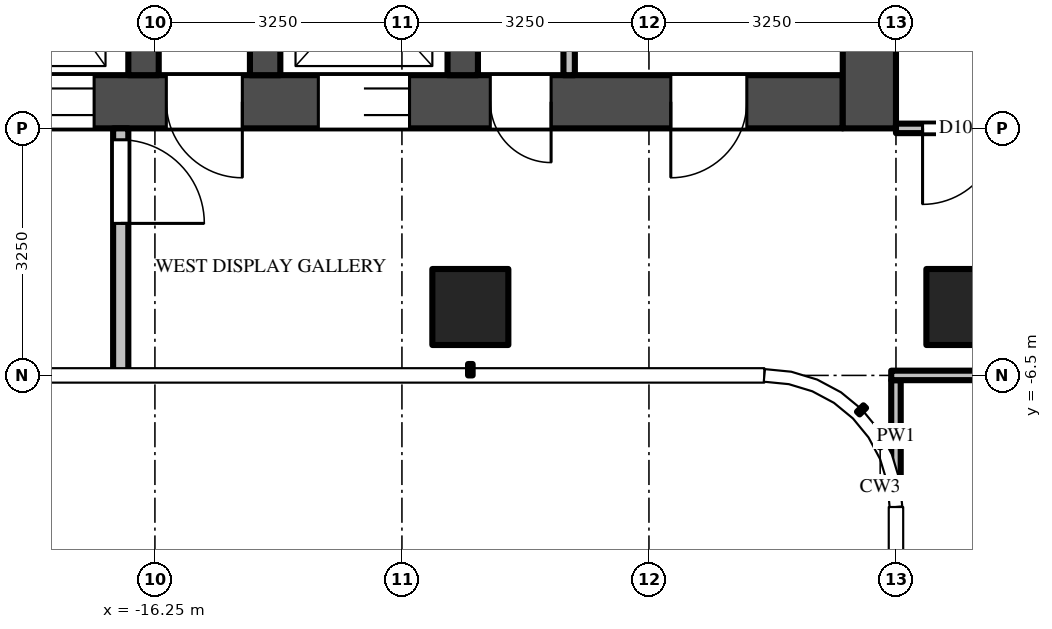
"""IFC4 building model, lengths in metres.
Left out: names, types, materials, properties, quantities, classifications, styles, units other than length and angle.
Written with IfcOpenShell. Run it as: python <this file> out.ifc"""

import sys

from ifc_helpers import new_model, si_unit, direction, frame, frame_2d, origin, origin_2d, place, context, subcontext, project, spatial, polyline, rectangle, outline, extrude, source, transform, mapped, element, fill, save


model = new_model("IFC4")
c1 = context("Model", 3, precision=1e-05, world=origin(), true_north=direction((0.0, 1.0)))
c2 = subcontext(c1, "Body", "Model", "MODEL_VIEW")
j1 = project(units=[si_unit("LENGTHUNIT", "METRE"), si_unit("PLANEANGLEUNIT", "RADIAN")], contexts=[c1])
p1 = place(None, origin())
s1 = spatial("IfcSite", under=j1, at=p1, CompositionType="ELEMENT")
p2 = place(p1, origin())
s2 = spatial("IfcBuilding", under=s1, at=p2, CompositionType="ELEMENT")
p3 = place(p2, frame((0.0, 0.0, 314.5)))
s3 = spatial("IfcBuildingStorey", under=s2, at=p3, CompositionType="ELEMENT", Elevation=314.5)
m1 = source(origin(), c2, "Body", "SweptSolid", [
    extrude(rectangle(XDim=1.0, YDim=1.0, at=origin_2d()), origin(), (0.0, 0.0, 1.0), 3.9),
])
for number, where, z_axis, x_axis in (
    (1, (-5.6, -5.6, 0.0), (0.0, 0.0, 1.0), (1.0, 0.0, 0.0)),
    (2, (-12.1, -5.6, 0.0), (0.0, 0.0, 1.0), (1.0, 0.0, 0.0)),
):
    element("IfcColumn", number, at=place(p3, frame(where, z_axis=z_axis, x_axis=x_axis)), inside=s3, PredefinedType="COLUMN", context=c2, shape_type="MappedRepresentation", body=[
        mapped(m1, transform((0.0, 0.0, 0.0))),
    ])
m2 = source(origin(), c2, "Body", "SweptSolid", [
    extrude(rectangle(XDim=14.85, YDim=0.7, at=frame_2d((7.425, 0.0))), origin(), (0.0, 0.0, 1.0), 3.7),
])
p4 = place(p3, frame((-7.2, -2.9, 0.0), z_axis=(0.0, 0.0, 1.0), x_axis=(-1.0, 0.0, 0.0)))
e3 = element("IfcWall", 3, at=p4, inside=s3, PredefinedType="SHEAR", context=c2, shape_type="MappedRepresentation", body=[
    mapped(m2, transform((0.0, 0.0, 0.0))),
])
m3 = source(origin(), c2, "Body", "SweptSolid", [
    extrude(rectangle(XDim=1.2, YDim=2.1, at=frame_2d((0.6, 1.05))), frame((0.0, 0.36, 0.0), z_axis=(0.0, -1.0, 0.0), x_axis=(1.0, 0.0, 0.0)), (0.0, 0.0, 1.0), 0.72),
])
p5 = place(p4, frame((5.7, 0.0, 0.0)))
e4 = element("IfcOpeningElement", 4, at=p5, cuts=e3, PredefinedType="OPENING", context=c2, shape_type="MappedRepresentation", body=[
    mapped(m3, transform((0.0, 0.0, 0.0))),
])
m4 = source(origin(), c2, "Body", "SweptSolid", [
    extrude(rectangle(XDim=1.3, YDim=2.1, at=frame_2d((0.65, 1.05))), frame((0.0, 0.36, 0.0), z_axis=(0.0, -1.0, 0.0), x_axis=(1.0, 0.0, 0.0)), (0.0, 0.0, 1.0), 0.72),
])
p6 = place(p4, frame((12.2, 0.0, 0.0)))
e5 = element("IfcOpeningElement", 5, at=p6, cuts=e3, PredefinedType="OPENING", context=c2, shape_type="MappedRepresentation", body=[
    mapped(m4, transform((0.0, 0.0, 0.0))),
])
p7 = place(p4, frame((9.85, 0.0, 0.0)))
e6 = element("IfcOpeningElement", 6, at=p7, cuts=e3, PredefinedType="OPENING", context=c2, shape_type="MappedRepresentation", body=[
    mapped(m3, transform((0.0, 0.0, 0.0))),
])
m5 = source(origin(), c2, "Body", "SweptSolid", [
    extrude(rectangle(XDim=1.0, YDim=2.1, at=frame_2d((0.5, 1.05))), frame((0.0, 0.36, 0.0), z_axis=(0.0, -1.0, 0.0), x_axis=(1.0, 0.0, 0.0)), (0.0, 0.0, 1.0), 0.72),
])
p8 = place(p4, frame((7.9, 0.0, 0.0)))
e7 = element("IfcOpeningElement", 7, at=p8, cuts=e3, PredefinedType="OPENING", context=c2, shape_type="MappedRepresentation", body=[
    mapped(m5, transform((0.0, 0.0, 0.0))),
])
p9 = place(p4, frame((1.262, 0.0, 0.0)))
e8 = element("IfcOpeningElement", 8, at=p9, cuts=e3, PredefinedType="OPENING", context=c2, shape_type="MappedRepresentation", body=[
    mapped(m5, transform((0.0, 0.0, 0.0))),
])
m6 = source(origin(), c2, "Body", "SweptSolid", [
    extrude(rectangle(XDim=0.8, YDim=2.1, at=frame_2d((0.4, 1.05))), frame((0.0, 0.36, 0.0), z_axis=(0.0, -1.0, 0.0), x_axis=(1.0, 0.0, 0.0)), (0.0, 0.0, 1.0), 0.72),
])
p10 = place(p4, frame((3.837, 0.0, 0.0)))
e9 = element("IfcOpeningElement", 9, at=p10, cuts=e3, PredefinedType="OPENING", context=c2, shape_type="MappedRepresentation", body=[
    mapped(m6, transform((0.0, 0.0, 0.0))),
])
m7 = source(origin(), c2, "Body", "SweptSolid", [
    extrude(rectangle(XDim=9.05, YDim=0.7, at=frame_2d((4.525, 0.0))), origin(), (0.0, 0.0, 1.0), 3.7),
])
p11 = place(p3, frame((-6.85, 5.8, 0.0), z_axis=(0.0, 0.0, 1.0), x_axis=(0.0, -1.0, 0.0)))
e10 = element("IfcWall", 10, at=p11, inside=s3, PredefinedType="SHEAR", context=c2, shape_type="MappedRepresentation", body=[
    mapped(m7, transform((0.0, 0.0, 0.0))),
])
m8 = source(origin(), c2, "Body", "SweptSolid", [
    extrude(rectangle(XDim=1.8, YDim=2.1, at=frame_2d((0.9, 1.05))), frame((0.0, 0.36, 0.0), z_axis=(0.0, -1.0, 0.0), x_axis=(1.0, 0.0, 0.0)), (0.0, 0.0, 1.0), 0.72),
])
p12 = place(p11, frame((3.15, 0.0, 0.0)))
e11 = element("IfcOpeningElement", 11, at=p12, cuts=e10, PredefinedType="OPENING", context=c2, shape_type="MappedRepresentation", body=[
    mapped(m8, transform((0.0, 0.0, 0.0))),
])
m9 = source(origin(), c2, "Body", "SweptSolid", [
    extrude(rectangle(XDim=2.45, YDim=0.4, at=frame_2d((1.225, 0.0))), origin(), (0.0, 0.0, 1.0), 3.7),
])
for number, where, z_axis, x_axis in (
    (12, (-12.2, -0.1, 0.0), (0.0, 0.0, 1.0), (0.0, -1.0, 0.0)),
    (13, (-14.8, -0.1, 0.0), (0.0, 0.0, 1.0), (0.0, -1.0, 0.0)),
    (14, (-16.4, -0.1, 0.0), (0.0, 0.0, 1.0), (0.0, -1.0, 0.0)),
):
    element("IfcWall", number, at=place(p3, frame(where, z_axis=z_axis, x_axis=x_axis)), inside=s3, PredefinedType="SHEAR", context=c2, shape_type="MappedRepresentation", body=[
        mapped(m9, transform((0.0, 0.0, 0.0))),
    ])
m10 = source(origin(), c2, "Body", "SweptSolid", [
    extrude(rectangle(XDim=3.25, YDim=0.2, at=frame_2d((1.625, 0.0))), origin(), (0.0, 0.0, 1.0), 3.7),
])
p13 = place(p3, frame((-16.7, -3.25, 0.0), z_axis=(0.0, 0.0, 1.0), x_axis=(0.0, -1.0, 0.0)))
e15 = element("IfcWall", 15, at=p13, inside=s3, PredefinedType="PARTITIONING", context=c2, shape_type="MappedRepresentation", body=[
    mapped(m10, transform((0.0, 0.0, 0.0))),
])
m11 = source(origin(), c2, "Body", "SweptSolid", [
    extrude(rectangle(XDim=1.1, YDim=2.1, at=frame_2d((0.55, 1.05))), frame((0.0, 0.11, 0.0), z_axis=(0.0, -1.0, 0.0), x_axis=(1.0, 0.0, 0.0)), (0.0, 0.0, 1.0), 0.22),
])
p14 = place(p13, frame((0.15, 0.0, 0.0)))
e16 = element("IfcOpeningElement", 16, at=p14, cuts=e15, PredefinedType="OPENING", context=c2, shape_type="MappedRepresentation", body=[
    mapped(m11, transform((0.0, 0.0, 0.0))),
])
m12 = source(origin(), c2, "Body", "SweptSolid", [
    extrude(rectangle(XDim=2.45, YDim=0.15, at=frame_2d((1.225, 0.0))), origin(), (0.0, 0.0, 1.0), 3.7),
])
p15 = place(p3, frame((-10.8, -0.1, 0.0), z_axis=(0.0, 0.0, 1.0), x_axis=(0.0, -1.0, 0.0)))
e17 = element("IfcWall", 17, at=p15, inside=s3, PredefinedType="PARTITIONING", context=c2, shape_type="MappedRepresentation", body=[
    mapped(m12, transform((0.0, 0.0, 0.0))),
])
p16 = place(p3, origin())
e18 = element("IfcWall", 18, at=p16, inside=s3, PredefinedType="USERDEFINED", context=c2, shape_type="SweptSolid", body=[
    extrude(outline(polyline([(-16.518, -8.683), (-17.453, -8.871), (-18.346, -8.878), (-19.222, -8.721), (-19.33, -8.684), (-19.137, -8.116), (-18.295, -8.277), (-17.514, -8.271), (-16.681, -8.107), (-16.652, -8.254), (-16.668, -8.259), (-16.518, -8.683)])), origin(), (0.0, 0.0, 1.0), 0.5),
])
m13 = source(origin(), c2, "Body", "SweptSolid", [
    extrude(rectangle(XDim=1.469, YDim=0.125, at=frame_2d((0.734, 0.0))), origin(), (0.0, 0.0, 1.0), 3.7),
])
p17 = place(p3, frame((-6.5, -6.562, 0.0), z_axis=(0.0, 0.0, 1.0), x_axis=(0.0, -1.0, 0.0)))
e19 = element("IfcWall", 19, at=p17, inside=s3, PredefinedType="PARTITIONING", context=c2, shape_type="MappedRepresentation", body=[
    mapped(m13, transform((0.0, 0.0, 0.0))),
])
m14 = source(origin(), c2, "Body", "SweptSolid", [
    extrude(rectangle(XDim=3.725, YDim=0.125, at=frame_2d((1.863, 0.0))), origin(), (0.0, 0.0, 1.0), 2.78),
])
p18 = place(p3, frame((-2.837, -6.5, 0.0), z_axis=(0.0, 0.0, 1.0), x_axis=(-1.0, 0.0, 0.0)))
e20 = element("IfcWall", 20, at=p18, inside=s3, PredefinedType="PARTITIONING", context=c2, shape_type="MappedRepresentation", body=[
    mapped(m14, transform((0.0, 0.0, 0.0))),
])
m15 = source(origin(), c2, "Body", "SweptSolid", [
    extrude(rectangle(XDim=5.363, YDim=0.125, at=frame_2d((2.681, 0.0))), origin(), (0.0, 0.0, 1.0), 2.997),
])
p19 = place(p3, frame((-1.137, -3.25, 0.0), z_axis=(0.0, 0.0, 1.0), x_axis=(-1.0, 0.0, 0.0)))
e21 = element("IfcWall", 21, at=p19, inside=s3, PredefinedType="PARTITIONING", context=c2, shape_type="MappedRepresentation", body=[
    mapped(m15, transform((0.0, 0.0, 0.0))),
])
m16 = source(origin(), c2, "Body", "SweptSolid", [
    extrude(rectangle(XDim=1.0, YDim=2.1, at=frame_2d((0.5, 1.05))), frame((0.0, 0.073, 0.0), z_axis=(0.0, -1.0, 0.0), x_axis=(1.0, 0.0, 0.0)), (0.0, 0.0, 1.0), 0.145),
])
p20 = place(p19, frame((4.012, 0.0, 0.0)))
e22 = element("IfcOpeningElement", 22, at=p20, cuts=e21, PredefinedType="OPENING", context=c2, shape_type="MappedRepresentation", body=[
    mapped(m16, transform((0.0, 0.0, 0.0))),
])
m17 = source(origin(), c2, "Body", "SweptSolid", [
    extrude(rectangle(XDim=1.2, YDim=2.1, at=frame_2d((0.6, 1.05))), frame((0.0, -0.275, 0.0), z_axis=(0.0, -1.0, 0.0), x_axis=(1.0, 0.0, 0.0)), (0.0, 0.0, 1.0), 0.05),
])
p21 = place(p5, origin())
e23 = element("IfcDoor", 23, at=p21, inside=s3, OperationType="DOUBLE_DOOR_SLIDING", PredefinedType="DOOR", context=c2, shape_type="MappedRepresentation", body=[
    mapped(m17, transform((0.0, 0.0, 0.0))),
])
fill(e4, e23)
p22 = place(p7, origin())
e24 = element("IfcDoor", 24, at=p22, inside=s3, OperationType="DOUBLE_DOOR_SLIDING", PredefinedType="DOOR", context=c2, shape_type="MappedRepresentation", body=[
    mapped(m17, transform((0.0, 0.0, 0.0))),
])
fill(e6, e24)
m18 = source(origin(), c2, "Body", "SweptSolid", [
    extrude(rectangle(XDim=1.0, YDim=2.1, at=frame_2d((0.5, 1.05))), frame((0.0, -0.275, 0.0), z_axis=(0.0, -1.0, 0.0), x_axis=(1.0, 0.0, 0.0)), (0.0, 0.0, 1.0), 0.05),
])
p23 = place(p8, origin())
e25 = element("IfcDoor", 25, at=p23, inside=s3, OperationType="SINGLE_SWING_LEFT", PredefinedType="DOOR", context=c2, shape_type="MappedRepresentation", body=[
    mapped(m18, transform((0.0, 0.0, 0.0))),
])
fill(e7, e25)
m19 = source(origin(), c2, "Body", "SweptSolid", [
    extrude(rectangle(XDim=1.1, YDim=2.1, at=frame_2d((0.55, 1.05))), frame((0.0, 0.025, 0.0), z_axis=(0.0, -1.0, 0.0), x_axis=(1.0, 0.0, 0.0)), (0.0, 0.0, 1.0), 0.05),
])
p24 = place(p14, origin())
e26 = element("IfcDoor", 26, at=p24, inside=s3, OperationType="SINGLE_SWING_RIGHT", PredefinedType="DOOR", context=c2, shape_type="MappedRepresentation", body=[
    mapped(m19, transform((0.0, 0.0, 0.0))),
])
fill(e16, e26)
p25 = place(p9, origin())
e27 = element("IfcDoor", 27, at=p25, inside=s3, OperationType="SINGLE_SWING_RIGHT", PredefinedType="DOOR", context=c2, shape_type="MappedRepresentation", body=[
    mapped(m18, transform((0.0, 0.0, 0.0))),
])
fill(e8, e27)
m20 = source(origin(), c2, "Body", "SweptSolid", [
    extrude(rectangle(XDim=0.8, YDim=2.1, at=frame_2d((0.4, 1.05))), frame((0.0, -0.275, 0.0), z_axis=(0.0, -1.0, 0.0), x_axis=(1.0, 0.0, 0.0)), (0.0, 0.0, 1.0), 0.05),
])
p26 = place(p10, origin())
e28 = element("IfcDoor", 28, at=p26, inside=s3, OperationType="SINGLE_SWING_LEFT", PredefinedType="DOOR", context=c2, shape_type="MappedRepresentation", body=[
    mapped(m20, transform((0.0, 0.0, 0.0))),
])
fill(e9, e28)
m21 = source(origin(), c2, "Body", "SweptSolid", [
    extrude(rectangle(XDim=1.0, YDim=2.1, at=frame_2d((0.5, 1.05))), frame((0.0, 0.025, 0.0), z_axis=(0.0, -1.0, 0.0), x_axis=(1.0, 0.0, 0.0)), (0.0, 0.0, 1.0), 0.05),
])
p27 = place(p20, origin())
e29 = element("IfcDoor", 29, at=p27, inside=s3, OperationType="SINGLE_SWING_RIGHT", PredefinedType="DOOR", context=c2, shape_type="MappedRepresentation", body=[
    mapped(m21, transform((0.0, 0.0, 0.0))),
])
fill(e22, e29)
save(model, sys.argv[1])
